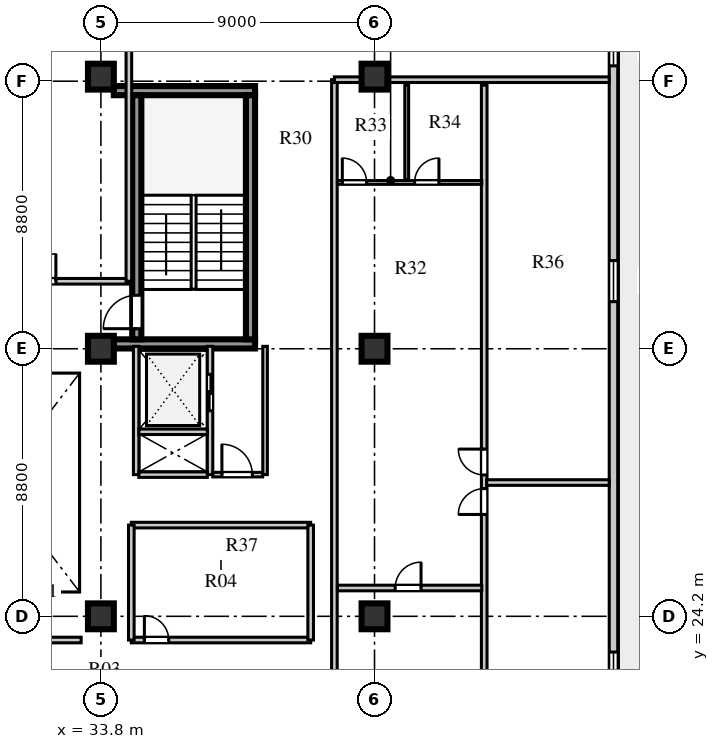
"""IFC4 building model, lengths in metres.
Left out: names, types, materials, properties, quantities, classifications, styles, units other than length and angle.
Written with IfcOpenShell. Run it as: python <this file> out.ifc"""

import sys

from ifc_helpers import new_model, si_unit, direction, frame, frame_2d, origin, origin_2d, place, context, subcontext, project, spatial, rectangle, extrude, element, fill, save


model = new_model("IFC4")
c1 = context("Model", 3, precision=1e-05, world=origin(), true_north=direction((0.0, 1.0)))
c2 = subcontext(c1, "Body", "Model", "MODEL_VIEW")
j1 = project(units=[si_unit("LENGTHUNIT", "METRE"), si_unit("PLANEANGLEUNIT", "RADIAN")], contexts=[c1])
p1 = place(None, origin())
s1 = spatial("IfcSite", under=j1, at=p1, CompositionType="ELEMENT")
p2 = place(p1, origin())
s2 = spatial("IfcBuilding", under=s1, at=p2, CompositionType="ELEMENT")
p3 = place(p2, frame((0.0, 0.0, 260.9)))
s3 = spatial("IfcBuildingStorey", under=s2, at=p3, CompositionType="ELEMENT", Elevation=260.9)
for number, where, z_axis, x_axis in (
    (1, (34.225, 33.16, 0.0), (0.0, 0.0, 1.0), (1.0, 0.0, 0.0)),
    (2, (34.225, 41.49, 0.0), (0.0, 0.0, 1.0), (1.0, 0.0, 0.0)),
):
    element("IfcWall", number, at=place(p3, frame(where, z_axis=z_axis, x_axis=x_axis)), inside=s3, PredefinedType="SHEAR", context=c2, shape_type="SweptSolid", body=[
        extrude(rectangle(XDim=4.645, YDim=0.3, at=frame_2d((2.323, 0.0))), origin(), (0.0, 0.0, 1.0), 3.66),
    ])
p4 = place(p3, frame((34.98, 33.31, 0.0), z_axis=(0.0, 0.0, 1.0), x_axis=(0.0, 1.0, 0.0)))
e3 = element("IfcWall", 3, at=p4, inside=s3, PredefinedType="SHEAR", context=c2, shape_type="SweptSolid", body=[
    extrude(rectangle(XDim=8.03, YDim=0.3, at=frame_2d((4.015, 0.0))), origin(), (0.0, 0.0, 1.0), 3.66),
])
p5 = place(p4, frame((0.35, 0.0, 0.0)))
e4 = element("IfcOpeningElement", 4, at=p5, cuts=e3, PredefinedType="OPENING", context=c2, shape_type="SweptSolid", body=[
    extrude(rectangle(XDim=1.1, YDim=2.1, at=frame_2d((0.55, 1.05))), frame((0.0, 0.16, 0.0), z_axis=(0.0, -1.0, 0.0), x_axis=(1.0, 0.0, 0.0)), (0.0, 0.0, 1.0), 0.32),
])
p6 = place(p3, frame((38.72, 33.31, 0.0), z_axis=(0.0, 0.0, 1.0), x_axis=(0.0, 1.0, 0.0)))
e5 = element("IfcWall", 5, at=p6, inside=s3, PredefinedType="SHEAR", context=c2, shape_type="SweptSolid", body=[
    extrude(rectangle(XDim=8.03, YDim=0.3, at=frame_2d((4.015, 0.0))), origin(), (0.0, 0.0, 1.0), 3.66),
])
for number, where, z_axis, x_axis in (
    (6, (33.8, 24.2, 0.0), (0.0, 0.0, 1.0), (1.0, 0.0, 0.0)),
    (7, (33.8, 33.0, 0.0), (0.0, 0.0, 1.0), (1.0, 0.0, 0.0)),
    (8, (33.8, 41.95, 0.0), (0.0, 0.0, 1.0), (1.0, 0.0, 0.0)),
    (9, (42.8, 24.2, 0.0), (0.0, 0.0, 1.0), (1.0, 0.0, 0.0)),
    (10, (42.8, 33.0, 0.0), (0.0, 0.0, 1.0), (1.0, 0.0, 0.0)),
    (11, (42.8, 41.95, 0.0), (0.0, 0.0, 1.0), (1.0, 0.0, 0.0)),
):
    element("IfcColumn", number, at=place(p3, frame(where, z_axis=z_axis, x_axis=x_axis)), inside=s3, PredefinedType="COLUMN", context=c2, shape_type="SweptSolid", body=[
        extrude(rectangle(XDim=0.85, YDim=0.85, at=origin_2d()), origin(), (0.0, 0.0, 1.0), 3.66),
    ])
p7 = place(p3, frame((50.66, 13.13, 0.0), z_axis=(0.0, 0.0, 1.0), x_axis=(0.0, 1.0, 0.0)))
e12 = element("IfcWall", 12, at=p7, inside=s3, PredefinedType="STANDARD", context=c2, shape_type="SweptSolid", body=[
    extrude(rectangle(XDim=30.94, YDim=0.28, at=frame_2d((15.47, 0.0))), origin(), (0.0, 0.0, 1.0), 3.66),
])
p8 = place(p7, frame((0.67, 0.0, 0.0)))
e13 = element("IfcOpeningElement", 13, at=p8, cuts=e12, PredefinedType="OPENING", context=c2, shape_type="SweptSolid", body=[
    extrude(rectangle(XDim=1.0, YDim=2.05, at=frame_2d((0.5, 1.025))), frame((0.0, 0.15, 0.0), z_axis=(0.0, -1.0, 0.0), x_axis=(1.0, 0.0, 0.0)), (0.0, 0.0, 1.0), 0.3),
])
p9 = place(p7, frame((7.795, 0.0, 0.8)))
e14 = element("IfcOpeningElement", 14, at=p9, cuts=e12, PredefinedType="OPENING", context=c2, shape_type="SweptSolid", body=[
    extrude(rectangle(XDim=2.1, YDim=1.95, at=frame_2d((1.05, 0.975))), frame((0.0, 0.15, 0.0), z_axis=(0.0, -1.0, 0.0), x_axis=(1.0, 0.0, 0.0)), (0.0, 0.0, 1.0), 0.3),
])
p10 = place(p7, frame((21.42, 0.0, 0.8)))
e15 = element("IfcOpeningElement", 15, at=p10, cuts=e12, PredefinedType="OPENING", context=c2, shape_type="SweptSolid", body=[
    extrude(rectangle(XDim=1.35, YDim=1.9, at=frame_2d((0.675, 0.95))), frame((0.0, 0.15, 0.0), z_axis=(0.0, -1.0, 0.0), x_axis=(1.0, 0.0, 0.0)), (0.0, 0.0, 1.0), 0.3),
])
p11 = place(p7, frame((29.175, 0.0, 0.8)))
e16 = element("IfcOpeningElement", 16, at=p11, cuts=e12, PredefinedType="OPENING", context=c2, shape_type="SweptSolid", body=[
    extrude(rectangle(XDim=1.2, YDim=1.75, at=frame_2d((0.6, 0.875))), frame((0.0, 0.15, 0.0), z_axis=(0.0, -1.0, 0.0), x_axis=(1.0, 0.0, 0.0)), (0.0, 0.0, 1.0), 0.3),
])
p12 = place(p3, frame((34.96, 28.86, 0.0), z_axis=(0.0, 0.0, 1.0), x_axis=(0.0, 1.0, 0.0)))
e17 = element("IfcWall", 17, at=p12, inside=s3, PredefinedType="SOLIDWALL", context=c2, shape_type="SweptSolid", body=[
    extrude(rectangle(XDim=4.22, YDim=0.18, at=frame_2d((2.11, 0.0))), origin(), (0.0, 0.0, 1.0), 3.66),
])
p13 = place(p3, frame((37.39, 28.86, 0.0), z_axis=(0.0, 0.0, 1.0), x_axis=(0.0, 1.0, 0.0)))
e18 = element("IfcWall", 18, at=p13, inside=s3, PredefinedType="SOLIDWALL", context=c2, shape_type="SweptSolid", body=[
    extrude(rectangle(XDim=4.22, YDim=0.18, at=frame_2d((2.11, 0.0))), origin(), (0.0, 0.0, 1.0), 3.66),
])
p14 = place(p13, frame((2.1, 0.0, 0.0)))
e19 = element("IfcOpeningElement", 19, at=p14, cuts=e18, PredefinedType="OPENING", context=c2, shape_type="SweptSolid", body=[
    extrude(rectangle(XDim=1.2, YDim=2.12, at=frame_2d((0.6, 1.06))), frame((0.0, 0.1, 0.0), z_axis=(0.0, -1.0, 0.0), x_axis=(1.0, 0.0, 0.0)), (0.0, 0.0, 1.0), 0.2),
])
for number, where, z_axis, x_axis in (
    (20, (35.05, 28.86, 0.0), (0.0, 0.0, 1.0), (1.0, 0.0, 0.0)),
    (21, (35.05, 30.27, 0.0), (0.0, 0.0, 1.0), (1.0, 0.0, 0.0)),
):
    element("IfcWall", number, at=place(p3, frame(where, z_axis=z_axis, x_axis=x_axis)), inside=s3, PredefinedType="SOLIDWALL", context=c2, shape_type="SweptSolid", body=[
        extrude(rectangle(XDim=2.25, YDim=0.18, at=frame_2d((1.125, 0.0))), origin(), (0.0, 0.0, 1.0), 3.66),
    ])
p15 = place(p3, frame((39.2, 28.86, 0.0), z_axis=(0.0, 0.0, 1.0), x_axis=(0.0, 1.0, 0.0)))
e22 = element("IfcWall", 22, at=p15, inside=s3, PredefinedType="PARTITIONING", context=c2, shape_type="SweptSolid", body=[
    extrude(rectangle(XDim=4.22, YDim=0.15, at=frame_2d((2.11, 0.0))), origin(), (0.0, 0.0, 1.0), 3.66),
])
p16 = place(p3, frame((37.48, 28.86, 0.0), z_axis=(0.0, 0.0, 1.0), x_axis=(1.0, 0.0, 0.0)))
e23 = element("IfcWall", 23, at=p16, inside=s3, PredefinedType="PARTITIONING", context=c2, shape_type="SweptSolid", body=[
    extrude(rectangle(XDim=1.64, YDim=0.15, at=frame_2d((0.82, 0.0))), origin(), (0.0, 0.0, 1.0), 3.66),
])
p17 = place(p16, frame((0.3, 0.0, 0.0)))
e24 = element("IfcOpeningElement", 24, at=p17, cuts=e23, PredefinedType="OPENING", context=c2, shape_type="SweptSolid", body=[
    extrude(rectangle(XDim=1.0, YDim=2.1, at=frame_2d((0.5, 1.05))), frame((0.0, 0.085, 0.0), z_axis=(0.0, -1.0, 0.0), x_axis=(1.0, 0.0, 0.0)), (0.0, 0.0, 1.0), 0.17),
])
p18 = place(p3, frame((27.15, 23.42, 0.0), z_axis=(0.0, 0.0, 1.0), x_axis=(1.0, 0.0, 0.0)))
e25 = element("IfcWall", 25, at=p18, inside=s3, PredefinedType="SOLIDWALL", context=c2, shape_type="SweptSolid", body=[
    extrude(rectangle(XDim=6.0, YDim=0.185, at=frame_2d((3.0, 0.0))), origin(), (0.0, 0.0, 1.0), 3.66),
])
p19 = place(p3, frame((25.22, 35.22, 0.0), z_axis=(0.0, 0.0, 1.0), x_axis=(1.0, 0.0, 0.0)))
e26 = element("IfcWall", 26, at=p19, inside=s3, PredefinedType="SOLIDWALL", context=c2, shape_type="SweptSolid", body=[
    extrude(rectangle(XDim=9.5, YDim=0.185, at=frame_2d((4.75, 0.0))), origin(), (0.0, 0.0, 1.0), 3.66),
])
p20 = place(p19, frame((1.2, 0.0, 0.0)))
e27 = element("IfcOpeningElement", 27, at=p20, cuts=e26, PredefinedType="OPENING", context=c2, shape_type="SweptSolid", body=[
    extrude(rectangle(XDim=1.0, YDim=2.08, at=frame_2d((0.5, 1.04))), frame((0.0, 0.103, 0.0), z_axis=(0.0, -1.0, 0.0), x_axis=(1.0, 0.0, 0.0)), (0.0, 0.0, 1.0), 0.205),
])
p21 = place(p19, frame((6.2, 0.0, 0.0)))
e28 = element("IfcOpeningElement", 28, at=p21, cuts=e26, PredefinedType="OPENING", context=c2, shape_type="SweptSolid", body=[
    extrude(rectangle(XDim=0.9, YDim=2.08, at=frame_2d((0.45, 1.04))), frame((0.0, 0.103, 0.0), z_axis=(0.0, -1.0, 0.0), x_axis=(1.0, 0.0, 0.0)), (0.0, 0.0, 1.0), 0.205),
])
p22 = place(p3, frame((34.72, 35.22, 0.0), z_axis=(0.0, 0.0, 1.0), x_axis=(0.0, 1.0, 0.0)))
e29 = element("IfcWall", 29, at=p22, inside=s3, PredefinedType="SOLIDWALL", context=c2, shape_type="SweptSolid", body=[
    extrude(rectangle(XDim=14.1, YDim=0.185, at=frame_2d((7.05, 0.0))), origin(), (0.0, 0.0, 1.0), 3.66),
])
p23 = place(p3, frame((41.48, 15.35, 0.0), z_axis=(0.0, 0.0, 1.0), x_axis=(0.0, 1.0, 0.0)))
e30 = element("IfcWall", 30, at=p23, inside=s3, PredefinedType="SOLIDWALL", context=c2, shape_type="SweptSolid", body=[
    extrude(rectangle(XDim=26.5, YDim=0.185, at=frame_2d((13.25, 0.0))), origin(), (0.0, 0.0, 1.0), 3.66),
])
p24 = place(p23, frame((0.75, 0.0, 0.0)))
e31 = element("IfcOpeningElement", 31, at=p24, cuts=e30, PredefinedType="OPENING", context=c2, shape_type="SweptSolid", body=[
    extrude(rectangle(XDim=0.95, YDim=2.1, at=frame_2d((0.475, 1.05))), frame((0.0, 0.103, 0.0), z_axis=(0.0, -1.0, 0.0), x_axis=(1.0, 0.0, 0.0)), (0.0, 0.0, 1.0), 0.205),
])
p25 = place(p3, frame((41.48, 41.85, 0.0), z_axis=(0.0, 0.0, 1.0), x_axis=(1.0, 0.0, 0.0)))
e32 = element("IfcWall", 32, at=p25, inside=s3, PredefinedType="SOLIDWALL", context=c2, shape_type="SweptSolid", body=[
    extrude(rectangle(XDim=9.04, YDim=0.185, at=frame_2d((4.52, 0.0))), origin(), (0.0, 0.0, 1.0), 3.06),
])
p26 = place(p3, frame((46.408, 15.53, 0.0), z_axis=(0.0, 0.0, 1.0), x_axis=(0.0, 1.0, 0.0)))
e33 = element("IfcWall", 33, at=p26, inside=s3, PredefinedType="SOLIDWALL", context=c2, shape_type="SweptSolid", body=[
    extrude(rectangle(XDim=26.14, YDim=0.185, at=frame_2d((13.07, 0.0))), origin(), (0.0, 0.0, 1.0), 3.66),
])
p27 = place(p26, frame((12.02, 0.0, 0.0)))
e34 = element("IfcOpeningElement", 34, at=p27, cuts=e33, PredefinedType="OPENING", context=c2, shape_type="SweptSolid", body=[
    extrude(rectangle(XDim=0.85, YDim=2.08, at=frame_2d((0.425, 1.04))), frame((0.0, 0.103, 0.0), z_axis=(0.0, -1.0, 0.0), x_axis=(1.0, 0.0, 0.0)), (0.0, 0.0, 1.0), 0.205),
])
p28 = place(p26, frame((13.32, 0.0, 0.0)))
e35 = element("IfcOpeningElement", 35, at=p28, cuts=e33, PredefinedType="OPENING", context=c2, shape_type="SweptSolid", body=[
    extrude(rectangle(XDim=0.85, YDim=2.08, at=frame_2d((0.425, 1.04))), frame((0.0, 0.103, 0.0), z_axis=(0.0, -1.0, 0.0), x_axis=(1.0, 0.0, 0.0)), (0.0, 0.0, 1.0), 0.205),
])
p29 = place(p3, frame((41.58, 38.47, 0.0), z_axis=(0.0, 0.0, 1.0), x_axis=(1.0, 0.0, 0.0)))
e36 = element("IfcWall", 36, at=p29, inside=s3, PredefinedType="PLUMBINGWALL", context=c2, shape_type="SweptSolid", body=[
    extrude(rectangle(XDim=4.748, YDim=0.125, at=frame_2d((2.374, 0.0))), origin(), (0.0, 0.0, 1.0), 3.66),
])
p30 = place(p29, frame((0.16, 0.0, 0.0)))
e37 = element("IfcOpeningElement", 37, at=p30, cuts=e36, PredefinedType="OPENING", context=c2, shape_type="SweptSolid", body=[
    extrude(rectangle(XDim=0.8, YDim=2.05, at=frame_2d((0.4, 1.025))), frame((0.0, 0.073, 0.0), z_axis=(0.0, -1.0, 0.0), x_axis=(1.0, 0.0, 0.0)), (0.0, 0.0, 1.0), 0.145),
])
p31 = place(p29, frame((2.539, 0.0, 0.0)))
e38 = element("IfcOpeningElement", 38, at=p31, cuts=e36, PredefinedType="OPENING", context=c2, shape_type="SweptSolid", body=[
    extrude(rectangle(XDim=0.8, YDim=2.05, at=frame_2d((0.4, 1.025))), frame((0.0, 0.073, 0.0), z_axis=(0.0, -1.0, 0.0), x_axis=(1.0, 0.0, 0.0)), (0.0, 0.0, 1.0), 0.145),
])
p32 = place(p3, frame((43.859, 38.55, 0.0), z_axis=(0.0, 0.0, 1.0), x_axis=(0.0, 1.0, 0.0)))
e39 = element("IfcWall", 39, at=p32, inside=s3, PredefinedType="PLUMBINGWALL", context=c2, shape_type="SweptSolid", body=[
    extrude(rectangle(XDim=3.12, YDim=0.125, at=frame_2d((1.56, 0.0))), origin(), (0.0, 0.0, 1.0), 3.66),
])
p33 = place(p3, frame((41.58, 25.131, 0.0), z_axis=(0.0, 0.0, 1.0), x_axis=(1.0, 0.0, 0.0)))
e40 = element("IfcWall", 40, at=p33, inside=s3, PredefinedType="SOLIDWALL", context=c2, shape_type="SweptSolid", body=[
    extrude(rectangle(XDim=4.748, YDim=0.185, at=frame_2d((2.374, 0.0))), origin(), (0.0, 0.0, 1.0), 3.66),
])
p34 = place(p33, frame((1.9, 0.0, 0.0)))
e41 = element("IfcOpeningElement", 41, at=p34, cuts=e40, PredefinedType="OPENING", context=c2, shape_type="SweptSolid", body=[
    extrude(rectangle(XDim=0.85, YDim=2.08, at=frame_2d((0.425, 1.04))), frame((0.0, 0.103, 0.0), z_axis=(0.0, -1.0, 0.0), x_axis=(1.0, 0.0, 0.0)), (0.0, 0.0, 1.0), 0.205),
])
p35 = place(p3, frame((46.488, 28.6, 0.0), z_axis=(0.0, 0.0, 1.0), x_axis=(1.0, 0.0, 0.0)))
e42 = element("IfcWall", 42, at=p35, inside=s3, PredefinedType="SOLIDWALL", context=c2, shape_type="SweptSolid", body=[
    extrude(rectangle(XDim=4.032, YDim=0.185, at=frame_2d((2.016, 0.0))), origin(), (0.0, 0.0, 1.0), 3.66),
])
p36 = place(p3, frame((34.8, 23.42, 0.0), z_axis=(0.0, 0.0, 1.0), x_axis=(1.0, 0.0, 0.0)))
e43 = element("IfcWall", 43, at=p36, inside=s3, PredefinedType="SOLIDWALL", context=c2, shape_type="SweptSolid", body=[
    extrude(rectangle(XDim=5.9, YDim=0.185, at=frame_2d((2.95, 0.0))), origin(), (0.0, 0.0, 1.0), 3.66),
])
p37 = place(p36, frame((0.43, 0.0, 0.0)))
e44 = element("IfcOpeningElement", 44, at=p37, cuts=e43, PredefinedType="OPENING", context=c2, shape_type="SweptSolid", body=[
    extrude(rectangle(XDim=0.8, YDim=2.05, at=frame_2d((0.4, 1.025))), frame((0.0, 0.103, 0.0), z_axis=(0.0, -1.0, 0.0), x_axis=(1.0, 0.0, 0.0)), (0.0, 0.0, 1.0), 0.205),
])
p38 = place(p3, frame((34.8, 27.2, 0.0), z_axis=(0.0, 0.0, 1.0), x_axis=(1.0, 0.0, 0.0)))
e45 = element("IfcWall", 45, at=p38, inside=s3, PredefinedType="SOLIDWALL", context=c2, shape_type="SweptSolid", body=[
    extrude(rectangle(XDim=5.9, YDim=0.185, at=frame_2d((2.95, 0.0))), origin(), (0.0, 0.0, 1.0), 3.31),
])
for number, where, z_axis, x_axis in (
    (46, (34.8, 23.42, 0.0), (0.0, 0.0, 1.0), (0.0, 1.0, 0.0)),
    (47, (40.7, 23.42, 0.0), (0.0, 0.0, 1.0), (0.0, 1.0, 0.0)),
):
    element("IfcWall", number, at=place(p3, frame(where, z_axis=z_axis, x_axis=x_axis)), inside=s3, PredefinedType="SOLIDWALL", context=c2, shape_type="SweptSolid", body=[
        extrude(rectangle(XDim=3.78, YDim=0.185, at=frame_2d((1.89, 0.0))), origin(), (0.0, 0.0, 1.0), 3.66),
    ])
p39 = place(p9, origin())
e48 = element("IfcWindow", 48, at=p39, inside=s3, PartitioningType="SINGLE_PANEL", PredefinedType="WINDOW", context=c2, shape_type="SweptSolid", body=[
    extrude(rectangle(XDim=2.1, YDim=1.95, at=frame_2d((1.05, 0.975))), frame((0.0, 0.03, 0.0), z_axis=(0.0, -1.0, 0.0), x_axis=(1.0, 0.0, 0.0)), (0.0, 0.0, 1.0), 0.06),
])
fill(e14, e48)
p40 = place(p10, origin())
e49 = element("IfcWindow", 49, at=p40, inside=s3, PartitioningType="SINGLE_PANEL", PredefinedType="WINDOW", context=c2, shape_type="SweptSolid", body=[
    extrude(rectangle(XDim=1.35, YDim=1.9, at=frame_2d((0.675, 0.95))), frame((0.0, 0.03, 0.0), z_axis=(0.0, -1.0, 0.0), x_axis=(1.0, 0.0, 0.0)), (0.0, 0.0, 1.0), 0.06),
])
fill(e15, e49)
p41 = place(p11, origin())
e50 = element("IfcWindow", 50, at=p41, inside=s3, PartitioningType="SINGLE_PANEL", PredefinedType="WINDOW", context=c2, shape_type="SweptSolid", body=[
    extrude(rectangle(XDim=1.2, YDim=1.75, at=frame_2d((0.6, 0.875))), frame((0.0, 0.03, 0.0), z_axis=(0.0, -1.0, 0.0), x_axis=(1.0, 0.0, 0.0)), (0.0, 0.0, 1.0), 0.06),
])
fill(e16, e50)
p42 = place(p5, origin())
e51 = element("IfcDoor", 51, at=p42, inside=s3, OperationType="SINGLE_SWING_LEFT", PredefinedType="DOOR", context=c2, shape_type="SweptSolid", body=[
    extrude(rectangle(XDim=1.1, YDim=2.1, at=frame_2d((0.55, 1.05))), frame((0.0, 0.025, 0.0), z_axis=(0.0, -1.0, 0.0), x_axis=(1.0, 0.0, 0.0)), (0.0, 0.0, 1.0), 0.05),
])
fill(e4, e51)
p43 = place(p14, frame((1.2, 0.0, 0.0), z_axis=(0.0, 0.0, 1.0), x_axis=(-1.0, 0.0, 0.0)))
e52 = element("IfcDoor", 52, at=p43, inside=s3, OperationType="DOUBLE_DOOR_SLIDING", PredefinedType="DOOR", context=c2, shape_type="SweptSolid", body=[
    extrude(rectangle(XDim=1.2, YDim=2.12, at=frame_2d((0.6, 1.06))), frame((0.0, 0.025, 0.0), z_axis=(0.0, -1.0, 0.0), x_axis=(1.0, 0.0, 0.0)), (0.0, 0.0, 1.0), 0.05),
])
fill(e19, e52)
p44 = place(p17, origin())
e53 = element("IfcDoor", 53, at=p44, inside=s3, OperationType="SINGLE_SWING_LEFT", PredefinedType="DOOR", context=c2, shape_type="SweptSolid", body=[
    extrude(rectangle(XDim=1.0, YDim=2.1, at=frame_2d((0.5, 1.05))), frame((0.0, 0.025, 0.0), z_axis=(0.0, -1.0, 0.0), x_axis=(1.0, 0.0, 0.0)), (0.0, 0.0, 1.0), 0.05),
])
fill(e24, e53)
p45 = place(p21, origin())
e54 = element("IfcDoor", 54, at=p45, inside=s3, OperationType="SINGLE_SWING_RIGHT", PredefinedType="DOOR", context=c2, shape_type="SweptSolid", body=[
    extrude(rectangle(XDim=0.9, YDim=2.08, at=frame_2d((0.45, 1.04))), frame((0.0, 0.025, 0.0), z_axis=(0.0, -1.0, 0.0), x_axis=(1.0, 0.0, 0.0)), (0.0, 0.0, 1.0), 0.05),
])
fill(e28, e54)
p46 = place(p34, frame((0.85, 0.0, 0.0), z_axis=(0.0, 0.0, 1.0), x_axis=(-1.0, 0.0, 0.0)))
e55 = element("IfcDoor", 55, at=p46, inside=s3, OperationType="SINGLE_SWING_LEFT", PredefinedType="DOOR", context=c2, shape_type="SweptSolid", body=[
    extrude(rectangle(XDim=0.85, YDim=2.08, at=frame_2d((0.425, 1.04))), frame((0.0, 0.025, 0.0), z_axis=(0.0, -1.0, 0.0), x_axis=(1.0, 0.0, 0.0)), (0.0, 0.0, 1.0), 0.05),
])
fill(e41, e55)
p47 = place(p30, origin())
e56 = element("IfcDoor", 56, at=p47, inside=s3, OperationType="SINGLE_SWING_LEFT", PredefinedType="DOOR", context=c2, shape_type="SweptSolid", body=[
    extrude(rectangle(XDim=0.8, YDim=2.05, at=frame_2d((0.4, 1.025))), frame((0.0, 0.025, 0.0), z_axis=(0.0, -1.0, 0.0), x_axis=(1.0, 0.0, 0.0)), (0.0, 0.0, 1.0), 0.05),
])
fill(e37, e56)
p48 = place(p31, origin())
e57 = element("IfcDoor", 57, at=p48, inside=s3, OperationType="SINGLE_SWING_RIGHT", PredefinedType="DOOR", context=c2, shape_type="SweptSolid", body=[
    extrude(rectangle(XDim=0.8, YDim=2.05, at=frame_2d((0.4, 1.025))), frame((0.0, 0.025, 0.0), z_axis=(0.0, -1.0, 0.0), x_axis=(1.0, 0.0, 0.0)), (0.0, 0.0, 1.0), 0.05),
])
fill(e38, e57)
p49 = place(p27, origin())
e58 = element("IfcDoor", 58, at=p49, inside=s3, OperationType="SINGLE_SWING_LEFT", PredefinedType="DOOR", context=c2, shape_type="SweptSolid", body=[
    extrude(rectangle(XDim=0.85, YDim=2.08, at=frame_2d((0.425, 1.04))), frame((0.0, 0.025, 0.0), z_axis=(0.0, -1.0, 0.0), x_axis=(1.0, 0.0, 0.0)), (0.0, 0.0, 1.0), 0.05),
])
fill(e34, e58)
p50 = place(p28, origin())
e59 = element("IfcDoor", 59, at=p50, inside=s3, OperationType="SINGLE_SWING_RIGHT", PredefinedType="DOOR", context=c2, shape_type="SweptSolid", body=[
    extrude(rectangle(XDim=0.85, YDim=2.08, at=frame_2d((0.425, 1.04))), frame((0.0, 0.025, 0.0), z_axis=(0.0, -1.0, 0.0), x_axis=(1.0, 0.0, 0.0)), (0.0, 0.0, 1.0), 0.05),
])
fill(e35, e59)
p51 = place(p37, origin())
e60 = element("IfcDoor", 60, at=p51, inside=s3, OperationType="SINGLE_SWING_LEFT", PredefinedType="DOOR", context=c2, shape_type="SweptSolid", body=[
    extrude(rectangle(XDim=0.8, YDim=2.05, at=frame_2d((0.4, 1.025))), frame((0.0, 0.025, 0.0), z_axis=(0.0, -1.0, 0.0), x_axis=(1.0, 0.0, 0.0)), (0.0, 0.0, 1.0), 0.05),
])
fill(e44, e60)
save(model, sys.argv[1])
